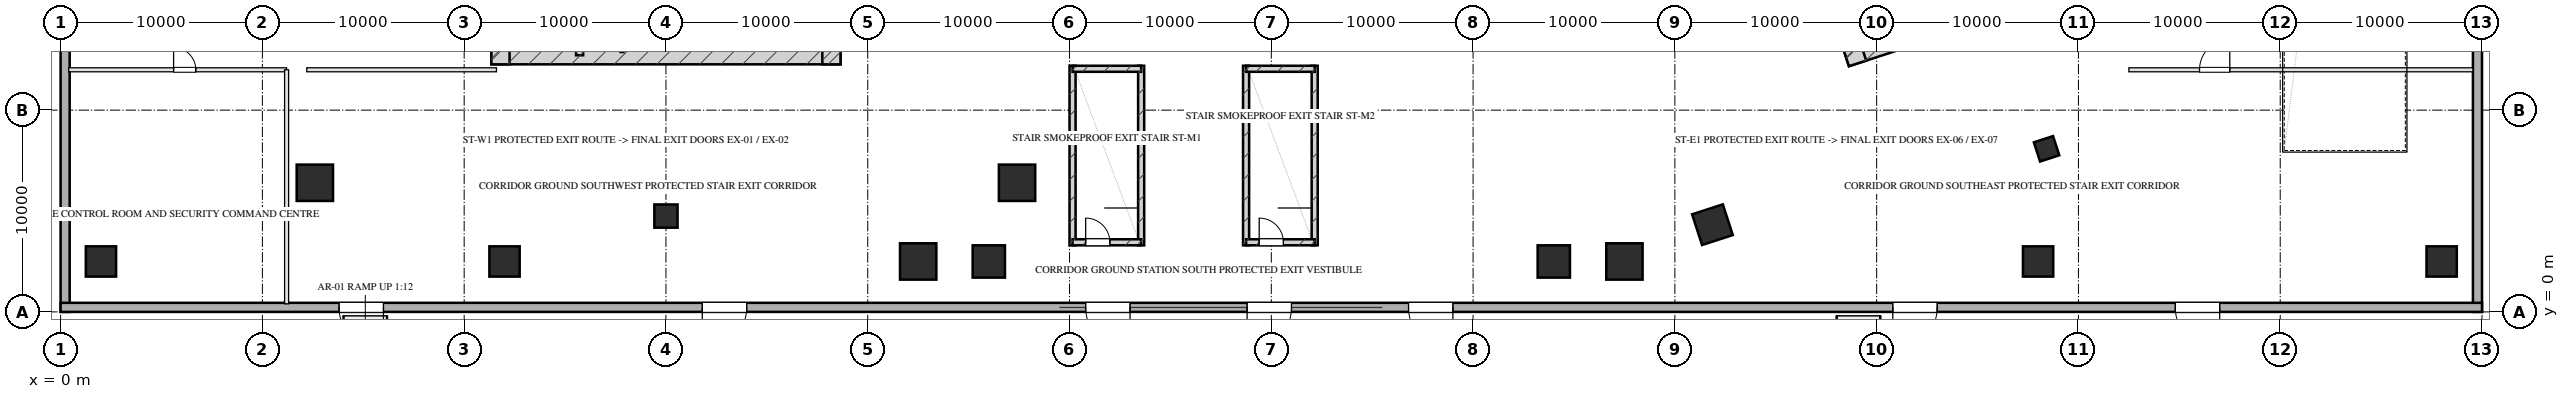
"""IFC4 building model, lengths in metres.
Left out: names, types, materials, properties, quantities, classifications, styles, units other than length and angle.
Written with IfcOpenShell. Run it as: python <this file> out.ifc"""

import sys

from ifc_helpers import new_model, si_unit, direction, frame, frame_2d, origin, origin_2d, place, context, subcontext, project, spatial, rectangle, hollow_rectangle, extrude, element, fill, save


model = new_model("IFC4")
c1 = context("Model", 3, precision=1e-05, world=origin(), true_north=direction((0.0, 1.0)))
c2 = subcontext(c1, "Body", "Model", "MODEL_VIEW")
j1 = project(units=[si_unit("LENGTHUNIT", "METRE"), si_unit("PLANEANGLEUNIT", "RADIAN")], contexts=[c1])
p1 = place(None, origin())
s1 = spatial("IfcSite", under=j1, at=p1, CompositionType="ELEMENT")
p2 = place(p1, origin())
s2 = spatial("IfcBuilding", under=s1, at=p2, CompositionType="ELEMENT")
p3 = place(p2, origin())
s3 = spatial("IfcBuildingStorey", under=s2, at=p3, CompositionType="ELEMENT", Elevation=0.0)
p4 = place(p3, frame((21.35, 12.72, 0.0), z_axis=(0.0, 0.0, 1.0), x_axis=(1.0, 0.0, 0.0)))
e1 = element("IfcWall", 1, at=p4, inside=s3, PredefinedType="SHEAR", context=c2, shape_type="SweptSolid", body=[
    extrude(rectangle(XDim=17.3, YDim=0.9, at=frame_2d((8.65, 0.0))), origin(), (0.0, 0.0, 1.0), 6.0),
])
for number, where, z_axis, x_axis in (
    (2, (21.8, 22.05, 0.0), (0.0, 0.0, 1.0), (0.0, -1.0, 0.0)),
    (3, (38.2, 22.05, 0.0), (0.0, 0.0, 1.0), (0.0, -1.0, 0.0)),
):
    element("IfcWall", number, at=place(p3, frame(where, z_axis=z_axis, x_axis=x_axis)), inside=s3, PredefinedType="SHEAR", context=c2, shape_type="SweptSolid", body=[
        extrude(rectangle(XDim=9.78, YDim=0.9, at=frame_2d((4.89, 0.0))), origin(), (0.0, 0.0, 1.0), 6.0),
    ])
p5 = place(p3, frame((25.72, 19.7, 0.0), z_axis=(0.0, 0.0, 1.0), x_axis=(0.0, -1.0, 0.0)))
e4 = element("IfcWall", 4, at=p5, inside=s3, PredefinedType="SHEAR", context=c2, shape_type="SweptSolid", body=[
    extrude(rectangle(XDim=6.98, YDim=0.35, at=frame_2d((3.49, 0.0))), origin(), (0.0, 0.0, 1.0), 6.0),
])
p6 = place(p3, frame((88.487, 12.605, 0.0), z_axis=(0.0, 0.0, 1.0), x_axis=(0.951055016115, 0.309021611416, 0.0)))
e5 = element("IfcWall", 5, at=p6, inside=s3, PredefinedType="SHEAR", context=c2, shape_type="SweptSolid", body=[
    extrude(rectangle(XDim=16.7, YDim=0.9, at=frame_2d((8.35, 0.0))), origin(), (0.0, 0.0, 1.0), 6.0),
])
p7 = place(p3, frame((86.032, 21.618, 0.0), z_axis=(0.0, 0.0, 1.0), x_axis=(0.30901438634, -0.951057363693, 0.0)))
e6 = element("IfcWall", 6, at=p7, inside=s3, PredefinedType="SHEAR", context=c2, shape_type="SweptSolid", body=[
    extrude(rectangle(XDim=9.78, YDim=0.9, at=frame_2d((4.89, 0.0))), origin(), (0.0, 0.0, 1.0), 6.0),
])
for number, where, z_axis, x_axis in (
    (7, (50.15, 3.3, 0.0), (0.0, 0.0, 1.0), (0.0, 1.0, 0.0)),
    (8, (53.55, 3.3, 0.0), (0.0, 0.0, 1.0), (0.0, 1.0, 0.0)),
):
    element("IfcWall", number, at=place(p3, frame(where, z_axis=z_axis, x_axis=x_axis)), inside=s3, PredefinedType="SHEAR", context=c2, shape_type="SweptSolid", body=[
        extrude(rectangle(XDim=8.9, YDim=0.3, at=frame_2d((4.45, 0.0))), origin(), (0.0, 0.0, 1.0), 3.8),
    ])
p8 = place(p3, frame((50.15, 12.05, 0.0), z_axis=(0.0, 0.0, 1.0), x_axis=(1.0, 0.0, 0.0)))
e9 = element("IfcWall", 9, at=p8, inside=s3, PredefinedType="SHEAR", context=c2, shape_type="SweptSolid", body=[
    extrude(rectangle(XDim=3.4, YDim=0.3, at=frame_2d((1.7, 0.0))), origin(), (0.0, 0.0, 1.0), 3.8),
])
p9 = place(p3, frame((50.15, 3.45, 0.0), z_axis=(0.0, 0.0, 1.0), x_axis=(1.0, 0.0, 0.0)))
e10 = element("IfcWall", 10, at=p9, inside=s3, PredefinedType="SHEAR", context=c2, shape_type="SweptSolid", body=[
    extrude(rectangle(XDim=3.4, YDim=0.3, at=frame_2d((1.7, 0.0))), origin(), (0.0, 0.0, 1.0), 3.8),
])
p10 = place(p9, frame((0.65, 0.0, 0.0)))
e11 = element("IfcOpeningElement", 11, at=p10, cuts=e10, PredefinedType="OPENING", context=c2, shape_type="SweptSolid", body=[
    extrude(rectangle(XDim=1.2, YDim=2.05, at=frame_2d((0.6, 1.025))), frame((0.0, 0.16, 0.0), z_axis=(0.0, -1.0, 0.0), x_axis=(1.0, 0.0, 0.0)), (0.0, 0.0, 1.0), 0.32),
])
for number, where, z_axis, x_axis in (
    (12, (58.75, 3.3, 0.0), (0.0, 0.0, 1.0), (0.0, 1.0, 0.0)),
    (13, (62.15, 3.3, 0.0), (0.0, 0.0, 1.0), (0.0, 1.0, 0.0)),
):
    element("IfcWall", number, at=place(p3, frame(where, z_axis=z_axis, x_axis=x_axis)), inside=s3, PredefinedType="SHEAR", context=c2, shape_type="SweptSolid", body=[
        extrude(rectangle(XDim=8.9, YDim=0.3, at=frame_2d((4.45, 0.0))), origin(), (0.0, 0.0, 1.0), 3.8),
    ])
p11 = place(p3, frame((58.75, 12.05, 0.0), z_axis=(0.0, 0.0, 1.0), x_axis=(1.0, 0.0, 0.0)))
e14 = element("IfcWall", 14, at=p11, inside=s3, PredefinedType="SHEAR", context=c2, shape_type="SweptSolid", body=[
    extrude(rectangle(XDim=3.4, YDim=0.3, at=frame_2d((1.7, 0.0))), origin(), (0.0, 0.0, 1.0), 3.8),
])
p12 = place(p3, frame((58.75, 3.45, 0.0), z_axis=(0.0, 0.0, 1.0), x_axis=(1.0, 0.0, 0.0)))
e15 = element("IfcWall", 15, at=p12, inside=s3, PredefinedType="SHEAR", context=c2, shape_type="SweptSolid", body=[
    extrude(rectangle(XDim=3.4, YDim=0.3, at=frame_2d((1.7, 0.0))), origin(), (0.0, 0.0, 1.0), 3.8),
])
p13 = place(p12, frame((0.65, 0.0, 0.0)))
e16 = element("IfcOpeningElement", 16, at=p13, cuts=e15, PredefinedType="OPENING", context=c2, shape_type="SweptSolid", body=[
    extrude(rectangle(XDim=1.2, YDim=2.05, at=frame_2d((0.6, 1.025))), frame((0.0, 0.16, 0.0), z_axis=(0.0, -1.0, 0.0), x_axis=(1.0, 0.0, 0.0)), (0.0, 0.0, 1.0), 0.32),
])
for number, where, z_axis, x_axis in (
    (17, (2.0, 2.5, 0.0), (0.0, 0.0, 1.0), (1.0, 0.0, 0.0)),
    (18, (22.0, 2.5, 0.0), (0.0, 0.0, 1.0), (1.0, 0.0, 0.0)),
):
    element("IfcColumn", number, at=place(p3, frame(where, z_axis=z_axis, x_axis=x_axis)), inside=s3, PredefinedType="COLUMN", context=c2, shape_type="SweptSolid", body=[
        extrude(rectangle(XDim=1.5, YDim=1.5, at=origin_2d()), origin(), (0.0, 0.0, 1.0), 6.001),
    ])
for number, where, z_axis, x_axis in (
    (19, (42.5, 2.5, 0.0), (0.0, 0.0, 1.0), (1.0, 0.0, 0.0)),
    (20, (77.5, 2.5, 0.0), (0.0, 0.0, 1.0), (1.0, 0.0, 0.0)),
):
    element("IfcColumn", number, at=place(p3, frame(where, z_axis=z_axis, x_axis=x_axis)), inside=s3, PredefinedType="COLUMN", context=c2, shape_type="SweptSolid", body=[
        extrude(hollow_rectangle(XDim=1.8, YDim=1.8, WallThickness=0.06, at=origin_2d()), origin(), (0.0, 0.0, 1.0), 6.001),
    ])
for number, where, z_axis, x_axis in (
    (21, (98.0, 2.5, 0.0), (0.0, 0.0, 1.0), (1.0, 0.0, 0.0)),
    (22, (118.0, 2.5, 0.0), (0.0, 0.0, 1.0), (1.0, 0.0, 0.0)),
):
    element("IfcColumn", number, at=place(p3, frame(where, z_axis=z_axis, x_axis=x_axis)), inside=s3, PredefinedType="COLUMN", context=c2, shape_type="SweptSolid", body=[
        extrude(rectangle(XDim=1.5, YDim=1.5, at=origin_2d()), origin(), (0.0, 0.0, 1.0), 6.001),
    ])
for number, where, z_axis, x_axis in (
    (23, (46.0, 2.5, 0.0), (0.0, 0.0, 1.0), (1.0, 0.0, 0.0)),
    (24, (74.0, 2.5, 0.0), (0.0, 0.0, 1.0), (1.0, 0.0, 0.0)),
):
    element("IfcColumn", number, at=place(p3, frame(where, z_axis=z_axis, x_axis=x_axis)), inside=s3, PredefinedType="COLUMN", context=c2, shape_type="SweptSolid", body=[
        extrude(hollow_rectangle(XDim=1.6, YDim=1.6, WallThickness=0.055, at=origin_2d()), origin(), (0.0, 0.0, 1.0), 6.001),
    ])
for number, where, z_axis, x_axis in (
    (25, (12.6, 6.4, 0.0), (0.0, 0.0, 1.0), (1.0, 0.0, 0.0)),
    (26, (47.4, 6.4, 0.0), (0.0, 0.0, 1.0), (1.0, 0.0, 0.0)),
):
    element("IfcColumn", number, at=place(p3, frame(where, z_axis=z_axis, x_axis=x_axis)), inside=s3, PredefinedType="COLUMN", context=c2, shape_type="SweptSolid", body=[
        extrude(hollow_rectangle(XDim=1.8, YDim=1.8, WallThickness=0.06, at=origin_2d()), origin(), (0.0, 0.0, 1.0), 6.001),
    ])
p14 = place(p3, frame((30.0, 4.75, 0.0), z_axis=(0.0, 0.0, 1.0), x_axis=(1.0, 0.0, 0.0)))
e27 = element("IfcColumn", 27, at=p14, inside=s3, PredefinedType="COLUMN", context=c2, shape_type="SweptSolid", body=[
    extrude(hollow_rectangle(XDim=1.15, YDim=1.15, WallThickness=0.04, at=origin_2d()), origin(), (0.0, 0.0, 1.0), 6.001),
])
p15 = place(p3, frame((81.863, 4.323, 0.0), z_axis=(0.0, 0.0, 1.0), x_axis=(0.951056516295, 0.309016994375, 0.0)))
e28 = element("IfcColumn", 28, at=p15, inside=s3, PredefinedType="COLUMN", context=c2, shape_type="SweptSolid", body=[
    extrude(hollow_rectangle(XDim=1.6, YDim=1.6, WallThickness=0.055, at=origin_2d()), origin(), (0.0, 0.0, 1.0), 6.001),
])
p16 = place(p3, frame((98.421, 8.084, 0.0), z_axis=(0.0, 0.0, 1.0), x_axis=(0.951056516295, 0.309016994375, 0.0)))
e29 = element("IfcColumn", 29, at=p16, inside=s3, PredefinedType="COLUMN", context=c2, shape_type="SweptSolid", body=[
    extrude(hollow_rectangle(XDim=1.0, YDim=1.0, WallThickness=0.036, at=origin_2d()), origin(), (0.0, 0.0, 1.0), 6.001),
])
p17 = place(p3, frame((0.225, 0.0, 0.0), z_axis=(0.0, 0.0, 1.0), x_axis=(0.0, 1.0, 0.0)))
e30 = element("IfcWall", 30, at=p17, inside=s3, PredefinedType="SOLIDWALL", context=c2, shape_type="SweptSolid", body=[
    extrude(rectangle(XDim=68.0, YDim=0.45, at=frame_2d((34.0, 0.0))), origin(), (0.0, 0.0, 1.0), 5.7),
])
p18 = place(p17, frame((31.0, 0.0, 0.0)))
e31 = element("IfcOpeningElement", 31, at=p18, cuts=e30, PredefinedType="OPENING", context=c2, shape_type="SweptSolid", body=[
    extrude(rectangle(XDim=2.2, YDim=2.4, at=frame_2d((1.1, 1.2))), frame((0.0, 0.235, 0.0), z_axis=(0.0, -1.0, 0.0), x_axis=(1.0, 0.0, 0.0)), (0.0, 0.0, 1.0), 0.47),
])
p19 = place(p3, frame((119.775, 68.0, 0.0), z_axis=(0.0, 0.0, 1.0), x_axis=(0.0, -1.0, 0.0)))
e32 = element("IfcWall", 32, at=p19, inside=s3, PredefinedType="SOLIDWALL", context=c2, shape_type="SweptSolid", body=[
    extrude(rectangle(XDim=68.0, YDim=0.45, at=frame_2d((34.0, 0.0))), origin(), (0.0, 0.0, 1.0), 5.7),
])
p20 = place(p19, frame((37.0, 0.0, 0.0)))
e33 = element("IfcOpeningElement", 33, at=p20, cuts=e32, PredefinedType="OPENING", context=c2, shape_type="SweptSolid", body=[
    extrude(rectangle(XDim=2.2, YDim=2.4, at=frame_2d((1.1, 1.2))), frame((0.0, 0.235, 0.0), z_axis=(0.0, -1.0, 0.0), x_axis=(1.0, 0.0, 0.0)), (0.0, 0.0, 1.0), 0.47),
])
p21 = place(p19, frame((5.8, 0.0, 0.0)))
e34 = element("IfcOpeningElement", 34, at=p21, cuts=e32, PredefinedType="OPENING", context=c2, shape_type="SweptSolid", body=[
    extrude(rectangle(XDim=4.2, YDim=2.5, at=frame_2d((2.1, 1.25))), frame((0.0, 0.235, 0.0), z_axis=(0.0, -1.0, 0.0), x_axis=(1.0, 0.0, 0.0)), (0.0, 0.0, 1.0), 0.47),
])
p22 = place(p3, frame((120.0, 0.225, 0.0), z_axis=(0.0, 0.0, 1.0), x_axis=(-1.0, 0.0, 0.0)))
e35 = element("IfcWall", 35, at=p22, inside=s3, PredefinedType="SOLIDWALL", context=c2, shape_type="SweptSolid", body=[
    extrude(rectangle(XDim=120.0, YDim=0.45, at=frame_2d((60.0, 0.0))), origin(), (0.0, 0.0, 1.0), 5.7),
])
p23 = place(p22, frame((13.0, 0.0, 0.0)))
e36 = element("IfcOpeningElement", 36, at=p23, cuts=e35, PredefinedType="OPENING", context=c2, shape_type="SweptSolid", body=[
    extrude(rectangle(XDim=2.2, YDim=2.4, at=frame_2d((1.1, 1.2))), frame((0.0, 0.235, 0.0), z_axis=(0.0, -1.0, 0.0), x_axis=(1.0, 0.0, 0.0)), (0.0, 0.0, 1.0), 0.47),
])
p24 = place(p22, frame((27.0, 0.0, 0.0)))
e37 = element("IfcOpeningElement", 37, at=p24, cuts=e35, PredefinedType="OPENING", context=c2, shape_type="SweptSolid", body=[
    extrude(rectangle(XDim=2.2, YDim=2.4, at=frame_2d((1.1, 1.2))), frame((0.0, 0.235, 0.0), z_axis=(0.0, -1.0, 0.0), x_axis=(1.0, 0.0, 0.0)), (0.0, 0.0, 1.0), 0.47),
])
p25 = place(p22, frame((51.0, 0.0, 0.0)))
e38 = element("IfcOpeningElement", 38, at=p25, cuts=e35, PredefinedType="OPENING", context=c2, shape_type="SweptSolid", body=[
    extrude(rectangle(XDim=2.2, YDim=2.4, at=frame_2d((1.1, 1.2))), frame((0.0, 0.235, 0.0), z_axis=(0.0, -1.0, 0.0), x_axis=(1.0, 0.0, 0.0)), (0.0, 0.0, 1.0), 0.47),
])
p26 = place(p22, frame((59.0, 0.0, 0.0)))
e39 = element("IfcOpeningElement", 39, at=p26, cuts=e35, PredefinedType="OPENING", context=c2, shape_type="SweptSolid", body=[
    extrude(rectangle(XDim=2.2, YDim=2.4, at=frame_2d((1.1, 1.2))), frame((0.0, 0.235, 0.0), z_axis=(0.0, -1.0, 0.0), x_axis=(1.0, 0.0, 0.0)), (0.0, 0.0, 1.0), 0.47),
])
p27 = place(p22, frame((67.0, 0.0, 0.0)))
e40 = element("IfcOpeningElement", 40, at=p27, cuts=e35, PredefinedType="OPENING", context=c2, shape_type="SweptSolid", body=[
    extrude(rectangle(XDim=2.2, YDim=2.4, at=frame_2d((1.1, 1.2))), frame((0.0, 0.235, 0.0), z_axis=(0.0, -1.0, 0.0), x_axis=(1.0, 0.0, 0.0)), (0.0, 0.0, 1.0), 0.47),
])
p28 = place(p22, frame((86.0, 0.0, 0.0)))
e41 = element("IfcOpeningElement", 41, at=p28, cuts=e35, PredefinedType="OPENING", context=c2, shape_type="SweptSolid", body=[
    extrude(rectangle(XDim=2.2, YDim=2.4, at=frame_2d((1.1, 1.2))), frame((0.0, 0.235, 0.0), z_axis=(0.0, -1.0, 0.0), x_axis=(1.0, 0.0, 0.0)), (0.0, 0.0, 1.0), 0.47),
])
p29 = place(p22, frame((104.0, 0.0, 0.0)))
e42 = element("IfcOpeningElement", 42, at=p29, cuts=e35, PredefinedType="OPENING", context=c2, shape_type="SweptSolid", body=[
    extrude(rectangle(XDim=2.2, YDim=2.4, at=frame_2d((1.1, 1.2))), frame((0.0, 0.235, 0.0), z_axis=(0.0, -1.0, 0.0), x_axis=(1.0, 0.0, 0.0)), (0.0, 0.0, 1.0), 0.47),
])
p30 = place(p3, frame((27.82, 16.55, 0.0), z_axis=(0.0, 0.0, 1.0), x_axis=(0.0, -1.0, 0.0)))
e43 = element("IfcWall", 43, at=p30, inside=s3, PredefinedType="PARTITIONING", context=c2, shape_type="SweptSolid", body=[
    extrude(rectangle(XDim=3.7, YDim=0.2, at=frame_2d((1.85, 0.0))), origin(), (0.0, 0.0, 1.0), 5.685),
])
p31 = place(p3, frame((0.4, 12.0, 0.0), z_axis=(0.0, 0.0, 1.0), x_axis=(1.0, 0.0, 0.0)))
e44 = element("IfcWall", 44, at=p31, inside=s3, PredefinedType="PARTITIONING", context=c2, shape_type="SweptSolid", body=[
    extrude(rectangle(XDim=10.8, YDim=0.2, at=frame_2d((5.4, 0.0))), origin(), (0.0, 0.0, 1.0), 5.685),
])
p32 = place(p31, frame((5.2, 0.0, 0.0)))
e45 = element("IfcOpeningElement", 45, at=p32, cuts=e44, PredefinedType="OPENING", context=c2, shape_type="SweptSolid", body=[
    extrude(rectangle(XDim=1.1, YDim=2.05, at=frame_2d((0.55, 1.025))), frame((0.0, 0.11, 0.0), z_axis=(0.0, -1.0, 0.0), x_axis=(1.0, 0.0, 0.0)), (0.0, 0.0, 1.0), 0.22),
])
p33 = place(p3, frame((11.2, 0.4, 0.0), z_axis=(0.0, 0.0, 1.0), x_axis=(0.0, 1.0, 0.0)))
e46 = element("IfcWall", 46, at=p33, inside=s3, PredefinedType="PARTITIONING", context=c2, shape_type="SweptSolid", body=[
    extrude(rectangle(XDim=11.6, YDim=0.2, at=frame_2d((5.8, 0.0))), origin(), (0.0, 0.0, 1.0), 5.685),
])
p34 = place(p3, frame((12.2, 12.0, 0.0), z_axis=(0.0, 0.0, 1.0), x_axis=(1.0, 0.0, 0.0)))
e47 = element("IfcWall", 47, at=p34, inside=s3, PredefinedType="PARTITIONING", context=c2, shape_type="SweptSolid", body=[
    extrude(rectangle(XDim=9.4, YDim=0.2, at=frame_2d((4.7, 0.0))), origin(), (0.0, 0.0, 1.0), 5.685),
])
p35 = place(p3, frame((102.5, 12.0, 0.0), z_axis=(0.0, 0.0, 1.0), x_axis=(1.0, 0.0, 0.0)))
e48 = element("IfcWall", 48, at=p35, inside=s3, PredefinedType="PARTITIONING", context=c2, shape_type="SweptSolid", body=[
    extrude(rectangle(XDim=17.05, YDim=0.2, at=frame_2d((8.525, 0.0))), origin(), (0.0, 0.0, 1.0), 5.685),
])
p36 = place(p35, frame((3.5, 0.0, 0.0)))
e49 = element("IfcOpeningElement", 49, at=p36, cuts=e48, PredefinedType="OPENING", context=c2, shape_type="SweptSolid", body=[
    extrude(rectangle(XDim=1.5, YDim=2.05, at=frame_2d((0.75, 1.025))), frame((0.0, 0.11, 0.0), z_axis=(0.0, -1.0, 0.0), x_axis=(1.0, 0.0, 0.0)), (0.0, 0.0, 1.0), 0.22),
])
p37 = place(p23, origin())
e50 = element("IfcDoor", 50, at=p37, inside=s3, OperationType="SINGLE_SWING_LEFT", PredefinedType="DOOR", context=c2, shape_type="SweptSolid", body=[
    extrude(rectangle(XDim=2.2, YDim=2.4, at=frame_2d((1.1, 1.2))), frame((0.0, 0.025, 0.0), z_axis=(0.0, -1.0, 0.0), x_axis=(1.0, 0.0, 0.0)), (0.0, 0.0, 1.0), 0.05),
])
fill(e36, e50)
p38 = place(p24, origin())
e51 = element("IfcDoor", 51, at=p38, inside=s3, OperationType="SINGLE_SWING_RIGHT", PredefinedType="DOOR", context=c2, shape_type="SweptSolid", body=[
    extrude(rectangle(XDim=2.2, YDim=2.4, at=frame_2d((1.1, 1.2))), frame((0.0, 0.025, 0.0), z_axis=(0.0, -1.0, 0.0), x_axis=(1.0, 0.0, 0.0)), (0.0, 0.0, 1.0), 0.05),
])
fill(e37, e51)
p39 = place(p25, origin())
e52 = element("IfcDoor", 52, at=p39, inside=s3, OperationType="SINGLE_SWING_LEFT", PredefinedType="DOOR", context=c2, shape_type="SweptSolid", body=[
    extrude(rectangle(XDim=2.2, YDim=2.4, at=frame_2d((1.1, 1.2))), frame((0.0, 0.025, 0.0), z_axis=(0.0, -1.0, 0.0), x_axis=(1.0, 0.0, 0.0)), (0.0, 0.0, 1.0), 0.05),
])
fill(e38, e52)
p40 = place(p26, origin())
e53 = element("IfcDoor", 53, at=p40, inside=s3, OperationType="SINGLE_SWING_RIGHT", PredefinedType="DOOR", context=c2, shape_type="SweptSolid", body=[
    extrude(rectangle(XDim=2.2, YDim=2.4, at=frame_2d((1.1, 1.2))), frame((0.0, 0.025, 0.0), z_axis=(0.0, -1.0, 0.0), x_axis=(1.0, 0.0, 0.0)), (0.0, 0.0, 1.0), 0.05),
])
fill(e39, e53)
p41 = place(p27, origin())
e54 = element("IfcDoor", 54, at=p41, inside=s3, OperationType="SINGLE_SWING_LEFT", PredefinedType="DOOR", context=c2, shape_type="SweptSolid", body=[
    extrude(rectangle(XDim=2.2, YDim=2.4, at=frame_2d((1.1, 1.2))), frame((0.0, 0.025, 0.0), z_axis=(0.0, -1.0, 0.0), x_axis=(1.0, 0.0, 0.0)), (0.0, 0.0, 1.0), 0.05),
])
fill(e40, e54)
p42 = place(p28, origin())
e55 = element("IfcDoor", 55, at=p42, inside=s3, OperationType="SINGLE_SWING_RIGHT", PredefinedType="DOOR", context=c2, shape_type="SweptSolid", body=[
    extrude(rectangle(XDim=2.2, YDim=2.4, at=frame_2d((1.1, 1.2))), frame((0.0, 0.025, 0.0), z_axis=(0.0, -1.0, 0.0), x_axis=(1.0, 0.0, 0.0)), (0.0, 0.0, 1.0), 0.05),
])
fill(e41, e55)
p43 = place(p29, origin())
e56 = element("IfcDoor", 56, at=p43, inside=s3, OperationType="SINGLE_SWING_LEFT", PredefinedType="DOOR", context=c2, shape_type="SweptSolid", body=[
    extrude(rectangle(XDim=2.2, YDim=2.4, at=frame_2d((1.1, 1.2))), frame((0.0, 0.025, 0.0), z_axis=(0.0, -1.0, 0.0), x_axis=(1.0, 0.0, 0.0)), (0.0, 0.0, 1.0), 0.05),
])
fill(e42, e56)
p44 = place(p32, origin())
e57 = element("IfcDoor", 57, at=p44, inside=s3, OperationType="SINGLE_SWING_LEFT", PredefinedType="DOOR", context=c2, shape_type="SweptSolid", body=[
    extrude(rectangle(XDim=1.1, YDim=2.05, at=frame_2d((0.55, 1.025))), frame((0.0, 0.025, 0.0), z_axis=(0.0, -1.0, 0.0), x_axis=(1.0, 0.0, 0.0)), (0.0, 0.0, 1.0), 0.05),
])
fill(e45, e57)
p45 = place(p36, origin())
e58 = element("IfcDoor", 58, at=p45, inside=s3, OperationType="SINGLE_SWING_RIGHT", PredefinedType="DOOR", context=c2, shape_type="SweptSolid", body=[
    extrude(rectangle(XDim=1.5, YDim=2.05, at=frame_2d((0.75, 1.025))), frame((0.0, 0.025, 0.0), z_axis=(0.0, -1.0, 0.0), x_axis=(1.0, 0.0, 0.0)), (0.0, 0.0, 1.0), 0.05),
])
fill(e49, e58)
p46 = place(p10, origin())
e59 = element("IfcDoor", 59, at=p46, inside=s3, OperationType="SINGLE_SWING_LEFT", PredefinedType="DOOR", context=c2, shape_type="SweptSolid", body=[
    extrude(rectangle(XDim=1.2, YDim=2.05, at=frame_2d((0.6, 1.025))), frame((0.0, 0.025, 0.0), z_axis=(0.0, -1.0, 0.0), x_axis=(1.0, 0.0, 0.0)), (0.0, 0.0, 1.0), 0.05),
])
fill(e11, e59)
p47 = place(p13, origin())
e60 = element("IfcDoor", 60, at=p47, inside=s3, OperationType="SINGLE_SWING_LEFT", PredefinedType="DOOR", context=c2, shape_type="SweptSolid", body=[
    extrude(rectangle(XDim=1.2, YDim=2.05, at=frame_2d((0.6, 1.025))), frame((0.0, 0.025, 0.0), z_axis=(0.0, -1.0, 0.0), x_axis=(1.0, 0.0, 0.0)), (0.0, 0.0, 1.0), 0.05),
])
fill(e16, e60)
save(model, sys.argv[1])
